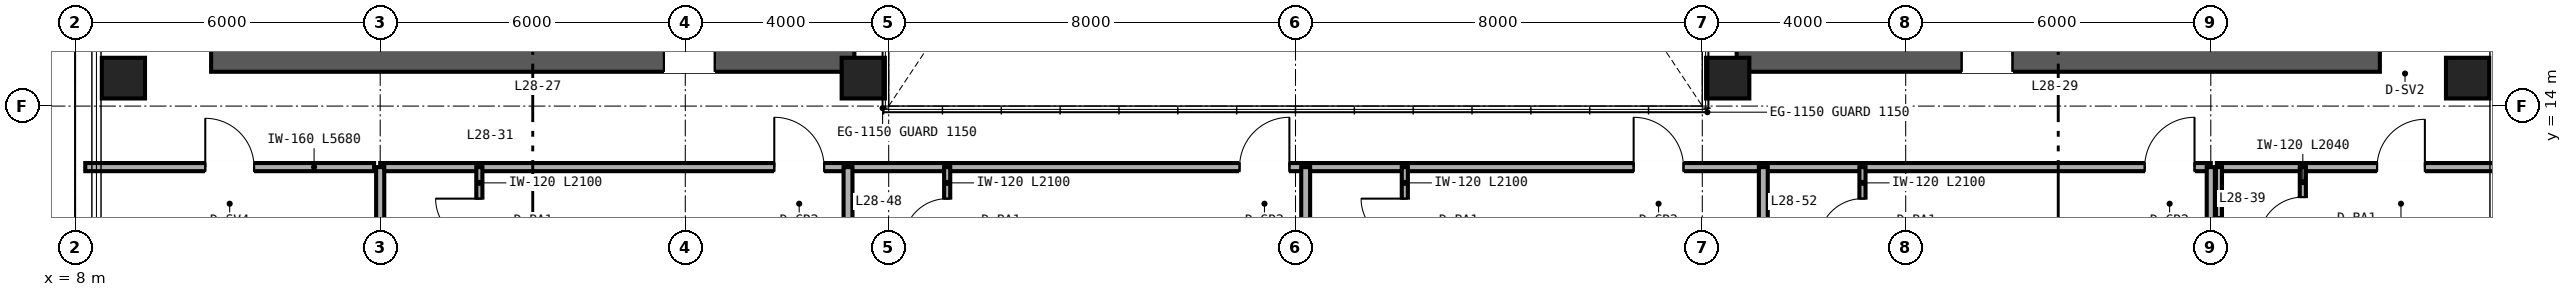
"""IFC4 building model, lengths in metres.
Left out: names, types, materials, properties, quantities, classifications, styles, units other than length and angle.
Written with IfcOpenShell. Run it as: python <this file> out.ifc"""

import sys

from ifc_helpers import new_model, si_unit, direction, frame, frame_2d, origin, origin_2d, place, context, subcontext, project, spatial, rectangle, hollow_rectangle, extrude, source, transform, mapped, element, fill, save


model = new_model("IFC4")
c1 = context("Model", 3, precision=1e-05, world=origin(), true_north=direction((0.0, 1.0)))
c2 = subcontext(c1, "Body", "Model", "MODEL_VIEW")
j1 = project(units=[si_unit("LENGTHUNIT", "METRE"), si_unit("PLANEANGLEUNIT", "RADIAN")], contexts=[c1])
p1 = place(None, origin())
s1 = spatial("IfcSite", under=j1, at=p1, CompositionType="ELEMENT")
p2 = place(p1, origin())
s2 = spatial("IfcBuilding", under=s1, at=p2, CompositionType="ELEMENT")
p3 = place(p2, frame((0.0, 0.0, 115.2)))
s3 = spatial("IfcBuildingStorey", under=s2, at=p3, CompositionType="ELEMENT", Elevation=115.2)
p4 = place(p3, frame((10.675, 15.0, 0.0), z_axis=(0.0, 0.0, 1.0), x_axis=(1.0, 0.0, 0.0)))
e1 = element("IfcWall", 1, at=p4, inside=s3, PredefinedType="SHEAR", context=c2, shape_type="SweptSolid", body=[
    extrude(rectangle(XDim=12.65, YDim=0.65, at=frame_2d((6.325, 0.0))), origin(), (0.0, 0.0, 1.0), 3.36),
])
p5 = place(p4, frame((8.905, 0.0, 0.0)))
e2 = element("IfcOpeningElement", 2, at=p5, cuts=e1, PredefinedType="OPENING", context=c2, shape_type="SweptSolid", body=[
    extrude(rectangle(XDim=1.0, YDim=2.15, at=frame_2d((0.5, 1.075))), frame((0.0, 0.335, 0.0), z_axis=(0.0, -1.0, 0.0), x_axis=(1.0, 0.0, 0.0)), (0.0, 0.0, 1.0), 0.67),
])
p6 = place(p3, frame((40.675, 15.0, 0.0), z_axis=(0.0, 0.0, 1.0), x_axis=(1.0, 0.0, 0.0)))
e3 = element("IfcWall", 3, at=p6, inside=s3, PredefinedType="SHEAR", context=c2, shape_type="SweptSolid", body=[
    extrude(rectangle(XDim=12.65, YDim=0.65, at=frame_2d((6.325, 0.0))), origin(), (0.0, 0.0, 1.0), 3.36),
])
p7 = place(p6, frame((4.425, 0.0, 0.0)))
e4 = element("IfcOpeningElement", 4, at=p7, cuts=e3, PredefinedType="OPENING", context=c2, shape_type="SweptSolid", body=[
    extrude(rectangle(XDim=1.0, YDim=2.15, at=frame_2d((0.5, 1.075))), frame((0.0, 0.335, 0.0), z_axis=(0.0, -1.0, 0.0), x_axis=(1.0, 0.0, 0.0)), (0.0, 0.0, 1.0), 0.67),
])
m1 = source(origin(), c2, "Body", "SweptSolid", [
    extrude(hollow_rectangle(XDim=0.85, YDim=0.8, WallThickness=0.032, at=origin_2d()), origin(), (0.0, 0.0, 1.0), 3.36),
])
for number, where, z_axis, x_axis in (
    (5, (8.95, 14.55, 0.0), (0.0, 0.0, 1.0), (1.0, 0.0, 0.0)),
    (6, (23.5, 14.55, 0.0), (0.0, 0.0, 1.0), (1.0, 0.0, 0.0)),
    (7, (40.5, 14.55, 0.0), (0.0, 0.0, 1.0), (1.0, 0.0, 0.0)),
    (8, (55.05, 14.55, 0.0), (0.0, 0.0, 1.0), (1.0, 0.0, 0.0)),
):
    element("IfcColumn", number, at=place(p3, frame(where, z_axis=z_axis, x_axis=x_axis)), inside=s3, PredefinedType="COLUMN", context=c2, shape_type="MappedRepresentation", body=[
        mapped(m1, transform((0.0, 0.0, 0.0), scale=1.0)),
    ])
p8 = place(p3, frame((8.2, 12.8, 0.0), z_axis=(0.0, 0.0, 1.0), x_axis=(1.0, 0.0, 0.0)))
e9 = element("IfcWall", 9, at=p8, inside=s3, PredefinedType="PARTITIONING", context=c2, shape_type="SweptSolid", body=[
    extrude(rectangle(XDim=5.68, YDim=0.16, at=frame_2d((2.84, 0.0))), origin(), (0.0, 0.0, 1.0), 3.36),
])
p9 = place(p8, frame((2.36, 0.0, 0.0)))
e10 = element("IfcOpeningElement", 10, at=p9, cuts=e9, PredefinedType="OPENING", context=c2, shape_type="SweptSolid", body=[
    extrude(rectangle(XDim=0.96, YDim=2.15, at=frame_2d((0.48, 1.075))), frame((0.0, 0.09, 0.0), z_axis=(0.0, -1.0, 0.0), x_axis=(1.0, 0.0, 0.0)), (0.0, 0.0, 1.0), 0.18),
])
p10 = place(p3, frame((50.12, 12.8, 0.0), z_axis=(0.0, 0.0, 1.0), x_axis=(1.0, 0.0, 0.0)))
e11 = element("IfcWall", 11, at=p10, inside=s3, PredefinedType="PARTITIONING", context=c2, shape_type="SweptSolid", body=[
    extrude(rectangle(XDim=5.68, YDim=0.16, at=frame_2d((2.84, 0.0))), origin(), (0.0, 0.0, 1.0), 3.36),
])
p11 = place(p10, frame((3.15, 0.0, 0.0)))
e12 = element("IfcOpeningElement", 12, at=p11, cuts=e11, PredefinedType="OPENING", context=c2, shape_type="SweptSolid", body=[
    extrude(rectangle(XDim=0.94, YDim=2.15, at=frame_2d((0.47, 1.075))), frame((0.0, 0.09, 0.0), z_axis=(0.0, -1.0, 0.0), x_axis=(1.0, 0.0, 0.0)), (0.0, 0.0, 1.0), 0.18),
])
p12 = place(p3, frame((51.81, 10.76, 0.0), z_axis=(0.0, 0.0, 1.0), x_axis=(0.0, 1.0, 0.0)))
e13 = element("IfcWall", 13, at=p12, inside=s3, PredefinedType="PARTITIONING", context=c2, shape_type="SweptSolid", body=[
    extrude(rectangle(XDim=2.04, YDim=0.12, at=frame_2d((1.02, 0.0))), origin(), (0.0, 0.0, 1.0), 3.36),
])
p13 = place(p12, frame((0.59, 0.0, 0.0)))
e14 = element("IfcOpeningElement", 14, at=p13, cuts=e13, PredefinedType="OPENING", context=c2, shape_type="SweptSolid", body=[
    extrude(rectangle(XDim=0.86, YDim=2.1, at=frame_2d((0.43, 1.05))), frame((0.0, 0.07, 0.0), z_axis=(0.0, -1.0, 0.0), x_axis=(1.0, 0.0, 0.0)), (0.0, 0.0, 1.0), 0.14),
])
p14 = place(p3, frame((50.16, 10.76, 0.0), z_axis=(0.0, 0.0, 1.0), x_axis=(0.0, 1.0, 0.0)))
e15 = element("IfcWall", 15, at=p14, inside=s3, PredefinedType="PARTITIONING", context=c2, shape_type="SweptSolid", body=[
    extrude(rectangle(XDim=2.04, YDim=0.12, at=frame_2d((1.02, 0.0))), origin(), (0.0, 0.0, 1.0), 3.36),
])
p15 = place(p3, frame((14.0, 12.8, 0.0), z_axis=(0.0, 0.0, 1.0), x_axis=(1.0, 0.0, 0.0)))
e16 = element("IfcWall", 16, at=p15, inside=s3, PredefinedType="PARTITIONING", context=c2, shape_type="SweptSolid", body=[
    extrude(rectangle(XDim=36.0, YDim=0.16, at=frame_2d((18.0, 0.0))), origin(), (0.0, 0.0, 1.0), 2.581),
])
p16 = place(p15, frame((7.75, 0.0, 0.0)))
e17 = element("IfcOpeningElement", 17, at=p16, cuts=e16, PredefinedType="OPENING", context=c2, shape_type="SweptSolid", body=[
    extrude(rectangle(XDim=0.98, YDim=2.2, at=frame_2d((0.49, 1.1))), frame((0.0, 0.09, 0.0), z_axis=(0.0, -1.0, 0.0), x_axis=(1.0, 0.0, 0.0)), (0.0, 0.0, 1.0), 0.18),
])
p17 = place(p15, frame((16.9, 0.0, 0.0)))
e18 = element("IfcOpeningElement", 18, at=p17, cuts=e16, PredefinedType="OPENING", context=c2, shape_type="SweptSolid", body=[
    extrude(rectangle(XDim=0.98, YDim=2.2, at=frame_2d((0.49, 1.1))), frame((0.0, 0.09, 0.0), z_axis=(0.0, -1.0, 0.0), x_axis=(1.0, 0.0, 0.0)), (0.0, 0.0, 1.0), 0.18),
])
p18 = place(p15, frame((24.65, 0.0, 0.0)))
e19 = element("IfcOpeningElement", 19, at=p18, cuts=e16, PredefinedType="OPENING", context=c2, shape_type="SweptSolid", body=[
    extrude(rectangle(XDim=0.98, YDim=2.2, at=frame_2d((0.49, 1.1))), frame((0.0, 0.09, 0.0), z_axis=(0.0, -1.0, 0.0), x_axis=(1.0, 0.0, 0.0)), (0.0, 0.0, 1.0), 0.18),
])
p19 = place(p15, frame((34.7, 0.0, 0.0)))
e20 = element("IfcOpeningElement", 20, at=p19, cuts=e16, PredefinedType="OPENING", context=c2, shape_type="SweptSolid", body=[
    extrude(rectangle(XDim=0.98, YDim=2.2, at=frame_2d((0.49, 1.1))), frame((0.0, 0.09, 0.0), z_axis=(0.0, -1.0, 0.0), x_axis=(1.0, 0.0, 0.0)), (0.0, 0.0, 1.0), 0.18),
])
for number, where, z_axis, x_axis in (
    (21, (14.0, 2.36, 0.0), (0.0, 0.0, 1.0), (0.0, 1.0, 0.0)),
    (22, (50.0, 2.36, 0.0), (0.0, 0.0, 1.0), (0.0, 1.0, 0.0)),
):
    element("IfcWall", number, at=place(p3, frame(where, z_axis=z_axis, x_axis=x_axis)), inside=s3, PredefinedType="PARTITIONING", context=c2, shape_type="SweptSolid", body=[
        extrude(rectangle(XDim=10.44, YDim=0.16, at=frame_2d((5.22, 0.0))), origin(), (0.0, 0.0, 1.0), 2.667),
    ])
p20 = place(p3, frame((23.2, 2.36, 0.0), z_axis=(0.0, 0.0, 1.0), x_axis=(0.0, 1.0, 0.0)))
e23 = element("IfcWall", 23, at=p20, inside=s3, PredefinedType="PARTITIONING", context=c2, shape_type="SweptSolid", body=[
    extrude(rectangle(XDim=10.44, YDim=0.175, at=frame_2d((5.22, 0.0))), origin(), (0.0, 0.0, 1.0), 2.433),
])
p21 = place(p3, frame((15.95, 10.7, 0.0), z_axis=(0.0, 0.0, 1.0), x_axis=(0.0, 1.0, 0.0)))
e24 = element("IfcWall", 24, at=p21, inside=s3, PredefinedType="PARTITIONING", context=c2, shape_type="SweptSolid", body=[
    extrude(rectangle(XDim=2.1, YDim=0.12, at=frame_2d((1.05, 0.0))), origin(), (0.0, 0.0, 1.0), 3.36),
])
p22 = place(p21, frame((0.62, 0.0, 0.0)))
e25 = element("IfcOpeningElement", 25, at=p22, cuts=e24, PredefinedType="OPENING", context=c2, shape_type="SweptSolid", body=[
    extrude(rectangle(XDim=0.86, YDim=2.1, at=frame_2d((0.43, 1.05))), frame((0.0, 0.07, 0.0), z_axis=(0.0, -1.0, 0.0), x_axis=(1.0, 0.0, 0.0)), (0.0, 0.0, 1.0), 0.14),
])
p23 = place(p3, frame((32.2, 2.36, 0.0), z_axis=(0.0, 0.0, 1.0), x_axis=(0.0, 1.0, 0.0)))
e26 = element("IfcWall", 26, at=p23, inside=s3, PredefinedType="PARTITIONING", context=c2, shape_type="SweptSolid", body=[
    extrude(rectangle(XDim=10.44, YDim=0.175, at=frame_2d((5.22, 0.0))), origin(), (0.0, 0.0, 1.0), 2.433),
])
p24 = place(p3, frame((25.15, 10.7, 0.0), z_axis=(0.0, 0.0, 1.0), x_axis=(0.0, 1.0, 0.0)))
e27 = element("IfcWall", 27, at=p24, inside=s3, PredefinedType="PARTITIONING", context=c2, shape_type="SweptSolid", body=[
    extrude(rectangle(XDim=2.1, YDim=0.12, at=frame_2d((1.05, 0.0))), origin(), (0.0, 0.0, 1.0), 3.36),
])
p25 = place(p24, frame((0.62, 0.0, 0.0)))
e28 = element("IfcOpeningElement", 28, at=p25, cuts=e27, PredefinedType="OPENING", context=c2, shape_type="SweptSolid", body=[
    extrude(rectangle(XDim=0.86, YDim=2.1, at=frame_2d((0.43, 1.05))), frame((0.0, 0.07, 0.0), z_axis=(0.0, -1.0, 0.0), x_axis=(1.0, 0.0, 0.0)), (0.0, 0.0, 1.0), 0.14),
])
p26 = place(p3, frame((41.2, 2.36, 0.0), z_axis=(0.0, 0.0, 1.0), x_axis=(0.0, 1.0, 0.0)))
e29 = element("IfcWall", 29, at=p26, inside=s3, PredefinedType="PARTITIONING", context=c2, shape_type="SweptSolid", body=[
    extrude(rectangle(XDim=10.44, YDim=0.175, at=frame_2d((5.22, 0.0))), origin(), (0.0, 0.0, 1.0), 2.823),
])
p27 = place(p3, frame((34.15, 10.7, 0.0), z_axis=(0.0, 0.0, 1.0), x_axis=(0.0, 1.0, 0.0)))
e30 = element("IfcWall", 30, at=p27, inside=s3, PredefinedType="PARTITIONING", context=c2, shape_type="SweptSolid", body=[
    extrude(rectangle(XDim=2.1, YDim=0.12, at=frame_2d((1.05, 0.0))), origin(), (0.0, 0.0, 1.0), 3.36),
])
p28 = place(p27, frame((0.62, 0.0, 0.0)))
e31 = element("IfcOpeningElement", 31, at=p28, cuts=e30, PredefinedType="OPENING", context=c2, shape_type="SweptSolid", body=[
    extrude(rectangle(XDim=0.86, YDim=2.1, at=frame_2d((0.43, 1.05))), frame((0.0, 0.07, 0.0), z_axis=(0.0, -1.0, 0.0), x_axis=(1.0, 0.0, 0.0)), (0.0, 0.0, 1.0), 0.14),
])
p29 = place(p3, frame((43.15, 10.7, 0.0), z_axis=(0.0, 0.0, 1.0), x_axis=(0.0, 1.0, 0.0)))
e32 = element("IfcWall", 32, at=p29, inside=s3, PredefinedType="PARTITIONING", context=c2, shape_type="SweptSolid", body=[
    extrude(rectangle(XDim=2.1, YDim=0.12, at=frame_2d((1.05, 0.0))), origin(), (0.0, 0.0, 1.0), 3.36),
])
p30 = place(p29, frame((0.62, 0.0, 0.0)))
e33 = element("IfcOpeningElement", 33, at=p30, cuts=e32, PredefinedType="OPENING", context=c2, shape_type="SweptSolid", body=[
    extrude(rectangle(XDim=0.86, YDim=2.1, at=frame_2d((0.43, 1.05))), frame((0.0, 0.07, 0.0), z_axis=(0.0, -1.0, 0.0), x_axis=(1.0, 0.0, 0.0)), (0.0, 0.0, 1.0), 0.14),
])
m2 = source(origin(), c2, "Body", "SweptSolid", [
    extrude(rectangle(XDim=1.0, YDim=2.15, at=frame_2d((0.5, 1.075))), frame((0.0, 0.025, 0.0), z_axis=(0.0, -1.0, 0.0), x_axis=(1.0, 0.0, 0.0)), (0.0, 0.0, 1.0), 0.05),
])
p31 = place(p5, origin())
e34 = element("IfcDoor", 34, at=p31, inside=s3, OperationType="SINGLE_SWING_LEFT", PredefinedType="DOOR", context=c2, shape_type="MappedRepresentation", body=[
    mapped(m2, transform((0.0, 0.0, 0.0), scale=1.0)),
])
fill(e2, e34)
p32 = place(p7, origin())
e35 = element("IfcDoor", 35, at=p32, inside=s3, OperationType="SINGLE_SWING_RIGHT", PredefinedType="DOOR", context=c2, shape_type="MappedRepresentation", body=[
    mapped(m2, transform((0.0, 0.0, 0.0), scale=1.0)),
])
fill(e4, e35)
m3 = source(origin(), c2, "Body", "SweptSolid", [
    extrude(rectangle(XDim=0.96, YDim=2.15, at=frame_2d((0.48, 1.075))), frame((0.0, 0.025, 0.0), z_axis=(0.0, -1.0, 0.0), x_axis=(1.0, 0.0, 0.0)), (0.0, 0.0, 1.0), 0.05),
])
p33 = place(p9, origin())
e36 = element("IfcDoor", 36, at=p33, inside=s3, OperationType="SINGLE_SWING_LEFT", PredefinedType="DOOR", context=c2, shape_type="MappedRepresentation", body=[
    mapped(m3, transform((0.0, 0.0, 0.0), scale=1.0)),
])
fill(e10, e36)
m4 = source(origin(), c2, "Body", "SweptSolid", [
    extrude(rectangle(XDim=0.86, YDim=2.1, at=frame_2d((0.43, 1.05))), frame((0.0, 0.025, 0.0), z_axis=(0.0, -1.0, 0.0), x_axis=(1.0, 0.0, 0.0)), (0.0, 0.0, 1.0), 0.05),
])
p34 = place(p13, origin())
e37 = element("IfcDoor", 37, at=p34, inside=s3, OperationType="SINGLE_SWING_LEFT", PredefinedType="DOOR", context=c2, shape_type="MappedRepresentation", body=[
    mapped(m4, transform((0.0, 0.0, 0.0), scale=1.0)),
])
fill(e14, e37)
m5 = source(origin(), c2, "Body", "SweptSolid", [
    extrude(rectangle(XDim=0.94, YDim=2.15, at=frame_2d((0.47, 1.075))), frame((0.0, 0.025, 0.0), z_axis=(0.0, -1.0, 0.0), x_axis=(1.0, 0.0, 0.0)), (0.0, 0.0, 1.0), 0.05),
])
p35 = place(p11, origin())
e38 = element("IfcDoor", 38, at=p35, inside=s3, OperationType="SINGLE_SWING_RIGHT", PredefinedType="DOOR", context=c2, shape_type="MappedRepresentation", body=[
    mapped(m5, transform((0.0, 0.0, 0.0), scale=1.0)),
])
fill(e12, e38)
p36 = place(p22, origin())
e39 = element("IfcDoor", 39, at=p36, inside=s3, OperationType="SINGLE_SWING_RIGHT", PredefinedType="DOOR", context=c2, shape_type="MappedRepresentation", body=[
    mapped(m4, transform((0.0, 0.0, 0.0), scale=1.0)),
])
fill(e25, e39)
p37 = place(p25, origin())
e40 = element("IfcDoor", 40, at=p37, inside=s3, OperationType="SINGLE_SWING_LEFT", PredefinedType="DOOR", context=c2, shape_type="MappedRepresentation", body=[
    mapped(m4, transform((0.0, 0.0, 0.0), scale=1.0)),
])
fill(e28, e40)
p38 = place(p28, origin())
e41 = element("IfcDoor", 41, at=p38, inside=s3, OperationType="SINGLE_SWING_RIGHT", PredefinedType="DOOR", context=c2, shape_type="MappedRepresentation", body=[
    mapped(m4, transform((0.0, 0.0, 0.0), scale=1.0)),
])
fill(e31, e41)
p39 = place(p30, origin())
e42 = element("IfcDoor", 42, at=p39, inside=s3, OperationType="SINGLE_SWING_LEFT", PredefinedType="DOOR", context=c2, shape_type="MappedRepresentation", body=[
    mapped(m4, transform((0.0, 0.0, 0.0), scale=1.0)),
])
fill(e33, e42)
m6 = source(origin(), c2, "Body", "SweptSolid", [
    extrude(rectangle(XDim=0.98, YDim=2.2, at=frame_2d((0.49, 1.1))), frame((0.0, 0.025, 0.0), z_axis=(0.0, -1.0, 0.0), x_axis=(1.0, 0.0, 0.0)), (0.0, 0.0, 1.0), 0.05),
])
p40 = place(p16, origin())
e43 = element("IfcDoor", 43, at=p40, inside=s3, OperationType="SINGLE_SWING_LEFT", PredefinedType="DOOR", context=c2, shape_type="MappedRepresentation", body=[
    mapped(m6, transform((0.0, 0.0, 0.0), scale=1.0)),
])
fill(e17, e43)
p41 = place(p17, origin())
e44 = element("IfcDoor", 44, at=p41, inside=s3, OperationType="SINGLE_SWING_RIGHT", PredefinedType="DOOR", context=c2, shape_type="MappedRepresentation", body=[
    mapped(m6, transform((0.0, 0.0, 0.0), scale=1.0)),
])
fill(e18, e44)
p42 = place(p18, origin())
e45 = element("IfcDoor", 45, at=p42, inside=s3, OperationType="SINGLE_SWING_LEFT", PredefinedType="DOOR", context=c2, shape_type="MappedRepresentation", body=[
    mapped(m6, transform((0.0, 0.0, 0.0), scale=1.0)),
])
fill(e19, e45)
p43 = place(p19, origin())
e46 = element("IfcDoor", 46, at=p43, inside=s3, OperationType="SINGLE_SWING_RIGHT", PredefinedType="DOOR", context=c2, shape_type="MappedRepresentation", body=[
    mapped(m6, transform((0.0, 0.0, 0.0), scale=1.0)),
])
fill(e20, e46)
save(model, sys.argv[1])
